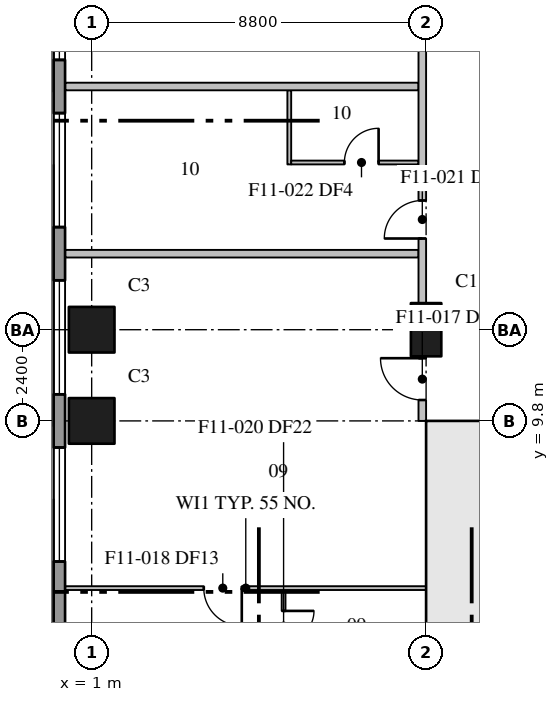
"""IFC4 building model, lengths in metres.
Left out: names, types, materials, properties, quantities, classifications, styles, units other than length and angle.
Written with IfcOpenShell. Run it as: python <this file> out.ifc"""

import sys

from ifc_helpers import new_model, si_unit, direction, frame, frame_2d, origin, origin_2d, place, context, subcontext, project, spatial, rectangle, extrude, element, fill, save


model = new_model("IFC4")
c1 = context("Model", 3, precision=1e-05, world=origin(), true_north=direction((0.0, 1.0)))
c2 = subcontext(c1, "Body", "Model", "MODEL_VIEW")
j1 = project(units=[si_unit("LENGTHUNIT", "METRE"), si_unit("PLANEANGLEUNIT", "RADIAN")], contexts=[c1])
p1 = place(None, origin())
s1 = spatial("IfcSite", under=j1, at=p1, CompositionType="ELEMENT")
p2 = place(p1, origin())
s2 = spatial("IfcBuilding", under=s1, at=p2, CompositionType="ELEMENT")
p3 = place(p2, frame((0.0, 0.0, 107.4)))
s3 = spatial("IfcBuildingStorey", under=s2, at=p3, CompositionType="ELEMENT", Elevation=107.4)
for number, where, z_axis, x_axis in (
    (1, (1.0, 9.8, 0.0), (0.0, 0.0, 1.0), (1.0, 0.0, 0.0)),
    (2, (1.0, 12.2, 0.0), (0.0, 0.0, 1.0), (1.0, 0.0, 0.0)),
):
    element("IfcColumn", number, at=place(p3, frame(where, z_axis=z_axis, x_axis=x_axis)), inside=s3, PredefinedType="COLUMN", context=c2, shape_type="SweptSolid", body=[
        extrude(rectangle(XDim=1.2, YDim=1.2, at=origin_2d()), origin(), (0.0, 0.0, 1.0), 3.7),
    ])
p4 = place(p3, frame((9.8, 12.2, 0.0), z_axis=(0.0, 0.0, 1.0), x_axis=(0.0, 1.0, 0.0)))
e3 = element("IfcColumn", 3, at=p4, inside=s3, PredefinedType="COLUMN", context=c2, shape_type="SweptSolid", body=[
    extrude(rectangle(XDim=1.4, YDim=0.8, at=origin_2d()), origin(), (0.0, 0.0, 1.0), 3.7),
])
p5 = place(p3, frame((10.6, 1.2, 0.0), z_axis=(0.0, 0.0, 1.0), x_axis=(0.0, 1.0, 0.0)))
e4 = element("IfcWall", 4, at=p5, inside=s3, PredefinedType="SHEAR", context=c2, shape_type="SweptSolid", body=[
    extrude(rectangle(XDim=8.6, YDim=0.8, at=frame_2d((4.3, 0.0))), origin(), (0.0, 0.0, 1.0), 3.7),
])
p6 = place(p3, frame((9.8, 9.6, 0.0), z_axis=(0.0, 0.0, 1.0), x_axis=(1.0, 0.0, 0.0)))
e5 = element("IfcWall", 5, at=p6, inside=s3, PredefinedType="SHEAR", context=c2, shape_type="SweptSolid", body=[
    extrude(rectangle(XDim=4.3, YDim=0.4, at=frame_2d((2.15, 0.0))), origin(), (0.0, 0.0, 1.0), 3.7),
])
p7 = place(p6, frame((2.05, 0.0, 0.0)))
e6 = element("IfcOpeningElement", 6, at=p7, cuts=e5, PredefinedType="OPENING", context=c2, shape_type="SweptSolid", body=[
    extrude(rectangle(XDim=1.2, YDim=2.1, at=frame_2d((0.6, 1.05))), frame((0.0, 0.21, 0.0), z_axis=(0.0, -1.0, 0.0), x_axis=(1.0, 0.0, 0.0)), (0.0, 0.0, 1.0), 0.42),
])
p8 = place(p3, frame((0.15, 78.7, 0.0), z_axis=(0.0, 0.0, 1.0), x_axis=(0.0, -1.0, 0.0)))
e7 = element("IfcWall", 7, at=p8, inside=s3, PredefinedType="STANDARD", context=c2, shape_type="SweptSolid", body=[
    extrude(rectangle(XDim=76.5, YDim=0.3, at=frame_2d((38.25, 0.0))), origin(), (0.0, 0.0, 1.0), 3.4),
])
p9 = place(p8, frame((3.6, 0.0, 0.75)))
e8 = element("IfcOpeningElement", 8, at=p9, cuts=e7, PredefinedType="OPENING", context=c2, shape_type="SweptSolid", body=[
    extrude(rectangle(XDim=3.0, YDim=2.3, at=frame_2d((1.5, 1.15))), frame((0.0, 0.16, 0.0), z_axis=(0.0, -1.0, 0.0), x_axis=(1.0, 0.0, 0.0)), (0.0, 0.0, 1.0), 0.32),
])
p10 = place(p8, frame((8.0, 0.0, 0.75)))
e9 = element("IfcOpeningElement", 9, at=p10, cuts=e7, PredefinedType="OPENING", context=c2, shape_type="SweptSolid", body=[
    extrude(rectangle(XDim=3.0, YDim=2.3, at=frame_2d((1.5, 1.15))), frame((0.0, 0.16, 0.0), z_axis=(0.0, -1.0, 0.0), x_axis=(1.0, 0.0, 0.0)), (0.0, 0.0, 1.0), 0.32),
])
p11 = place(p8, frame((12.4, 0.0, 0.75)))
e10 = element("IfcOpeningElement", 10, at=p11, cuts=e7, PredefinedType="OPENING", context=c2, shape_type="SweptSolid", body=[
    extrude(rectangle(XDim=3.0, YDim=2.3, at=frame_2d((1.5, 1.15))), frame((0.0, 0.16, 0.0), z_axis=(0.0, -1.0, 0.0), x_axis=(1.0, 0.0, 0.0)), (0.0, 0.0, 1.0), 0.32),
])
p12 = place(p8, frame((16.8, 0.0, 0.75)))
e11 = element("IfcOpeningElement", 11, at=p12, cuts=e7, PredefinedType="OPENING", context=c2, shape_type="SweptSolid", body=[
    extrude(rectangle(XDim=3.0, YDim=2.3, at=frame_2d((1.5, 1.15))), frame((0.0, 0.16, 0.0), z_axis=(0.0, -1.0, 0.0), x_axis=(1.0, 0.0, 0.0)), (0.0, 0.0, 1.0), 0.32),
])
p13 = place(p8, frame((21.2, 0.0, 0.75)))
e12 = element("IfcOpeningElement", 12, at=p13, cuts=e7, PredefinedType="OPENING", context=c2, shape_type="SweptSolid", body=[
    extrude(rectangle(XDim=3.0, YDim=2.3, at=frame_2d((1.5, 1.15))), frame((0.0, 0.16, 0.0), z_axis=(0.0, -1.0, 0.0), x_axis=(1.0, 0.0, 0.0)), (0.0, 0.0, 1.0), 0.32),
])
p14 = place(p8, frame((25.6, 0.0, 0.75)))
e13 = element("IfcOpeningElement", 13, at=p14, cuts=e7, PredefinedType="OPENING", context=c2, shape_type="SweptSolid", body=[
    extrude(rectangle(XDim=3.0, YDim=2.3, at=frame_2d((1.5, 1.15))), frame((0.0, 0.16, 0.0), z_axis=(0.0, -1.0, 0.0), x_axis=(1.0, 0.0, 0.0)), (0.0, 0.0, 1.0), 0.32),
])
p15 = place(p8, frame((30.0, 0.0, 0.75)))
e14 = element("IfcOpeningElement", 14, at=p15, cuts=e7, PredefinedType="OPENING", context=c2, shape_type="SweptSolid", body=[
    extrude(rectangle(XDim=3.0, YDim=2.3, at=frame_2d((1.5, 1.15))), frame((0.0, 0.16, 0.0), z_axis=(0.0, -1.0, 0.0), x_axis=(1.0, 0.0, 0.0)), (0.0, 0.0, 1.0), 0.32),
])
p16 = place(p8, frame((34.4, 0.0, 0.75)))
e15 = element("IfcOpeningElement", 15, at=p16, cuts=e7, PredefinedType="OPENING", context=c2, shape_type="SweptSolid", body=[
    extrude(rectangle(XDim=3.0, YDim=2.3, at=frame_2d((1.5, 1.15))), frame((0.0, 0.16, 0.0), z_axis=(0.0, -1.0, 0.0), x_axis=(1.0, 0.0, 0.0)), (0.0, 0.0, 1.0), 0.32),
])
p17 = place(p8, frame((38.8, 0.0, 0.75)))
e16 = element("IfcOpeningElement", 16, at=p17, cuts=e7, PredefinedType="OPENING", context=c2, shape_type="SweptSolid", body=[
    extrude(rectangle(XDim=3.0, YDim=2.3, at=frame_2d((1.5, 1.15))), frame((0.0, 0.16, 0.0), z_axis=(0.0, -1.0, 0.0), x_axis=(1.0, 0.0, 0.0)), (0.0, 0.0, 1.0), 0.32),
])
p18 = place(p8, frame((43.2, 0.0, 0.75)))
e17 = element("IfcOpeningElement", 17, at=p18, cuts=e7, PredefinedType="OPENING", context=c2, shape_type="SweptSolid", body=[
    extrude(rectangle(XDim=3.0, YDim=2.3, at=frame_2d((1.5, 1.15))), frame((0.0, 0.16, 0.0), z_axis=(0.0, -1.0, 0.0), x_axis=(1.0, 0.0, 0.0)), (0.0, 0.0, 1.0), 0.32),
])
p19 = place(p8, frame((47.6, 0.0, 0.75)))
e18 = element("IfcOpeningElement", 18, at=p19, cuts=e7, PredefinedType="OPENING", context=c2, shape_type="SweptSolid", body=[
    extrude(rectangle(XDim=3.0, YDim=2.3, at=frame_2d((1.5, 1.15))), frame((0.0, 0.16, 0.0), z_axis=(0.0, -1.0, 0.0), x_axis=(1.0, 0.0, 0.0)), (0.0, 0.0, 1.0), 0.32),
])
p20 = place(p8, frame((52.0, 0.0, 0.75)))
e19 = element("IfcOpeningElement", 19, at=p20, cuts=e7, PredefinedType="OPENING", context=c2, shape_type="SweptSolid", body=[
    extrude(rectangle(XDim=3.0, YDim=2.3, at=frame_2d((1.5, 1.15))), frame((0.0, 0.16, 0.0), z_axis=(0.0, -1.0, 0.0), x_axis=(1.0, 0.0, 0.0)), (0.0, 0.0, 1.0), 0.32),
])
p21 = place(p8, frame((56.4, 0.0, 0.75)))
e20 = element("IfcOpeningElement", 20, at=p21, cuts=e7, PredefinedType="OPENING", context=c2, shape_type="SweptSolid", body=[
    extrude(rectangle(XDim=3.0, YDim=2.3, at=frame_2d((1.5, 1.15))), frame((0.0, 0.16, 0.0), z_axis=(0.0, -1.0, 0.0), x_axis=(1.0, 0.0, 0.0)), (0.0, 0.0, 1.0), 0.32),
])
p22 = place(p8, frame((60.8, 0.0, 0.75)))
e21 = element("IfcOpeningElement", 21, at=p22, cuts=e7, PredefinedType="OPENING", context=c2, shape_type="SweptSolid", body=[
    extrude(rectangle(XDim=3.0, YDim=2.3, at=frame_2d((1.5, 1.15))), frame((0.0, 0.16, 0.0), z_axis=(0.0, -1.0, 0.0), x_axis=(1.0, 0.0, 0.0)), (0.0, 0.0, 1.0), 0.32),
])
p23 = place(p8, frame((65.2, 0.0, 0.75)))
e22 = element("IfcOpeningElement", 22, at=p23, cuts=e7, PredefinedType="OPENING", context=c2, shape_type="SweptSolid", body=[
    extrude(rectangle(XDim=3.0, YDim=2.3, at=frame_2d((1.5, 1.15))), frame((0.0, 0.16, 0.0), z_axis=(0.0, -1.0, 0.0), x_axis=(1.0, 0.0, 0.0)), (0.0, 0.0, 1.0), 0.32),
])
p24 = place(p8, frame((69.6, 0.0, 0.75)))
e23 = element("IfcOpeningElement", 23, at=p24, cuts=e7, PredefinedType="OPENING", context=c2, shape_type="SweptSolid", body=[
    extrude(rectangle(XDim=3.0, YDim=2.3, at=frame_2d((1.5, 1.15))), frame((0.0, 0.16, 0.0), z_axis=(0.0, -1.0, 0.0), x_axis=(1.0, 0.0, 0.0)), (0.0, 0.0, 1.0), 0.32),
])
p25 = place(p3, frame((9.7, 9.8, 0.0), z_axis=(0.0, 0.0, 1.0), x_axis=(0.0, 1.0, 0.0)))
e24 = element("IfcWall", 24, at=p25, inside=s3, PredefinedType="PARTITIONING", context=c2, shape_type="SweptSolid", body=[
    extrude(rectangle(XDim=1.7, YDim=0.2, at=frame_2d((0.85, 0.0))), origin(), (0.0, 0.0, 1.0), 3.4),
])
p26 = place(p25, frame((0.55, 0.0, 0.0)))
e25 = element("IfcOpeningElement", 25, at=p26, cuts=e24, PredefinedType="OPENING", context=c2, shape_type="SweptSolid", body=[
    extrude(rectangle(XDim=1.1, YDim=2.1, at=frame_2d((0.55, 1.05))), frame((0.0, 0.11, 0.0), z_axis=(0.0, -1.0, 0.0), x_axis=(1.0, 0.0, 0.0)), (0.0, 0.0, 1.0), 0.22),
])
p27 = place(p3, frame((9.7, 12.9, 0.0), z_axis=(0.0, 0.0, 1.0), x_axis=(0.0, 1.0, 0.0)))
e26 = element("IfcWall", 26, at=p27, inside=s3, PredefinedType="PARTITIONING", context=c2, shape_type="SweptSolid", body=[
    extrude(rectangle(XDim=7.5, YDim=0.2, at=frame_2d((3.75, 0.0))), origin(), (0.0, 0.0, 1.0), 3.4),
])
p28 = place(p27, frame((1.7, 0.0, 0.0)))
e27 = element("IfcOpeningElement", 27, at=p28, cuts=e26, PredefinedType="OPENING", context=c2, shape_type="SweptSolid", body=[
    extrude(rectangle(XDim=1.0, YDim=2.1, at=frame_2d((0.5, 1.05))), frame((0.0, 0.11, 0.0), z_axis=(0.0, -1.0, 0.0), x_axis=(1.0, 0.0, 0.0)), (0.0, 0.0, 1.0), 0.22),
])
for number, where, z_axis, x_axis in (
    (28, (0.31, 14.2, 0.0), (0.0, 0.0, 1.0), (1.0, 0.0, 0.0)),
    (29, (0.31, 18.6, 0.0), (0.0, 0.0, 1.0), (1.0, 0.0, 0.0)),
):
    element("IfcWall", number, at=place(p3, frame(where, z_axis=z_axis, x_axis=x_axis)), inside=s3, PredefinedType="PARTITIONING", context=c2, shape_type="SweptSolid", body=[
        extrude(rectangle(XDim=9.29, YDim=0.2, at=frame_2d((4.645, 0.0))), origin(), (0.0, 0.0, 1.0), 3.4),
    ])
p29 = place(p3, frame((6.05, 5.35, 0.0), z_axis=(0.0, 0.0, 1.0), x_axis=(0.0, -1.0, 0.0)))
e30 = element("IfcWall", 30, at=p29, inside=s3, PredefinedType="PARTITIONING", context=c2, shape_type="SweptSolid", body=[
    extrude(rectangle(XDim=4.4, YDim=0.1, at=frame_2d((2.2, 0.0))), origin(), (0.0, 0.0, 1.0), 3.4),
])
p30 = place(p29, frame((2.7, 0.0, 0.0)))
e31 = element("IfcOpeningElement", 31, at=p30, cuts=e30, PredefinedType="OPENING", context=c2, shape_type="SweptSolid", body=[
    extrude(rectangle(XDim=0.9, YDim=2.1, at=frame_2d((0.45, 1.05))), frame((0.0, 0.06, 0.0), z_axis=(0.0, -1.0, 0.0), x_axis=(1.0, 0.0, 0.0)), (0.0, 0.0, 1.0), 0.12),
])
p31 = place(p29, frame((0.55, 0.0, 0.0)))
e32 = element("IfcOpeningElement", 32, at=p31, cuts=e30, PredefinedType="OPENING", context=c2, shape_type="SweptSolid", body=[
    extrude(rectangle(XDim=0.8, YDim=2.1, at=frame_2d((0.4, 1.05))), frame((0.0, 0.06, 0.0), z_axis=(0.0, -1.0, 0.0), x_axis=(1.0, 0.0, 0.0)), (0.0, 0.0, 1.0), 0.12),
])
p32 = place(p3, frame((9.8, 5.4, 0.0), z_axis=(0.0, 0.0, 1.0), x_axis=(-1.0, 0.0, 0.0)))
e33 = element("IfcWall", 33, at=p32, inside=s3, PredefinedType="PARTITIONING", context=c2, shape_type="SweptSolid", body=[
    extrude(rectangle(XDim=9.49, YDim=0.1, at=frame_2d((4.745, 0.0))), origin(), (0.0, 0.0, 1.0), 3.4),
])
p33 = place(p32, frame((4.85, 0.0, 0.0)))
e34 = element("IfcOpeningElement", 34, at=p33, cuts=e33, PredefinedType="OPENING", context=c2, shape_type="SweptSolid", body=[
    extrude(rectangle(XDim=1.0, YDim=2.1, at=frame_2d((0.5, 1.05))), frame((0.0, 0.06, 0.0), z_axis=(0.0, -1.0, 0.0), x_axis=(1.0, 0.0, 0.0)), (0.0, 0.0, 1.0), 0.12),
])
p34 = place(p3, frame((6.2, 16.55, 0.0), z_axis=(0.0, 0.0, 1.0), x_axis=(0.0, 1.0, 0.0)))
e35 = element("IfcWall", 35, at=p34, inside=s3, PredefinedType="PARTITIONING", context=c2, shape_type="SweptSolid", body=[
    extrude(rectangle(XDim=1.95, YDim=0.1, at=frame_2d((0.975, 0.0))), origin(), (0.0, 0.0, 1.0), 3.4),
])
p35 = place(p3, frame((6.25, 16.6, 0.0), z_axis=(0.0, 0.0, 1.0), x_axis=(1.0, 0.0, 0.0)))
e36 = element("IfcWall", 36, at=p35, inside=s3, PredefinedType="PARTITIONING", context=c2, shape_type="SweptSolid", body=[
    extrude(rectangle(XDim=3.35, YDim=0.1, at=frame_2d((1.675, 0.0))), origin(), (0.0, 0.0, 1.0), 3.4),
])
p36 = place(p35, frame((1.4, 0.0, 0.0)))
e37 = element("IfcOpeningElement", 37, at=p36, cuts=e36, PredefinedType="OPENING", context=c2, shape_type="SweptSolid", body=[
    extrude(rectangle(XDim=0.9, YDim=2.1, at=frame_2d((0.45, 1.05))), frame((0.0, 0.06, 0.0), z_axis=(0.0, -1.0, 0.0), x_axis=(1.0, 0.0, 0.0)), (0.0, 0.0, 1.0), 0.12),
])
p37 = place(p21, origin())
e38 = element("IfcWindow", 38, at=p37, inside=s3, PartitioningType="SINGLE_PANEL", PredefinedType="WINDOW", context=c2, shape_type="SweptSolid", body=[
    extrude(rectangle(XDim=3.0, YDim=2.3, at=frame_2d((1.5, 1.15))), frame((0.0, 0.03, 0.0), z_axis=(0.0, -1.0, 0.0), x_axis=(1.0, 0.0, 0.0)), (0.0, 0.0, 1.0), 0.06),
])
fill(e20, e38)
p38 = place(p22, origin())
e39 = element("IfcWindow", 39, at=p38, inside=s3, PartitioningType="SINGLE_PANEL", PredefinedType="WINDOW", context=c2, shape_type="SweptSolid", body=[
    extrude(rectangle(XDim=3.0, YDim=2.3, at=frame_2d((1.5, 1.15))), frame((0.0, 0.03, 0.0), z_axis=(0.0, -1.0, 0.0), x_axis=(1.0, 0.0, 0.0)), (0.0, 0.0, 1.0), 0.06),
])
fill(e21, e39)
p39 = place(p23, origin())
e40 = element("IfcWindow", 40, at=p39, inside=s3, PartitioningType="SINGLE_PANEL", PredefinedType="WINDOW", context=c2, shape_type="SweptSolid", body=[
    extrude(rectangle(XDim=3.0, YDim=2.3, at=frame_2d((1.5, 1.15))), frame((0.0, 0.03, 0.0), z_axis=(0.0, -1.0, 0.0), x_axis=(1.0, 0.0, 0.0)), (0.0, 0.0, 1.0), 0.06),
])
fill(e22, e40)
p40 = place(p24, origin())
e41 = element("IfcWindow", 41, at=p40, inside=s3, PartitioningType="SINGLE_PANEL", PredefinedType="WINDOW", context=c2, shape_type="SweptSolid", body=[
    extrude(rectangle(XDim=3.0, YDim=2.3, at=frame_2d((1.5, 1.15))), frame((0.0, 0.03, 0.0), z_axis=(0.0, -1.0, 0.0), x_axis=(1.0, 0.0, 0.0)), (0.0, 0.0, 1.0), 0.06),
])
fill(e23, e41)
p41 = place(p26, origin())
e42 = element("IfcDoor", 42, at=p41, inside=s3, OperationType="SINGLE_SWING_RIGHT", PredefinedType="DOOR", context=c2, shape_type="SweptSolid", body=[
    extrude(rectangle(XDim=1.1, YDim=2.1, at=frame_2d((0.55, 1.05))), frame((0.0, 0.025, 0.0), z_axis=(0.0, -1.0, 0.0), x_axis=(1.0, 0.0, 0.0)), (0.0, 0.0, 1.0), 0.05),
])
fill(e25, e42)
p42 = place(p33, origin())
e43 = element("IfcDoor", 43, at=p42, inside=s3, OperationType="SINGLE_SWING_LEFT", PredefinedType="DOOR", context=c2, shape_type="SweptSolid", body=[
    extrude(rectangle(XDim=1.0, YDim=2.1, at=frame_2d((0.5, 1.05))), frame((0.0, 0.025, 0.0), z_axis=(0.0, -1.0, 0.0), x_axis=(1.0, 0.0, 0.0)), (0.0, 0.0, 1.0), 0.05),
])
fill(e34, e43)
p43 = place(p31, origin())
e44 = element("IfcDoor", 44, at=p43, inside=s3, OperationType="SINGLE_SWING_LEFT", PredefinedType="DOOR", context=c2, shape_type="SweptSolid", body=[
    extrude(rectangle(XDim=0.8, YDim=2.1, at=frame_2d((0.4, 1.05))), frame((0.0, 0.025, 0.0), z_axis=(0.0, -1.0, 0.0), x_axis=(1.0, 0.0, 0.0)), (0.0, 0.0, 1.0), 0.05),
])
fill(e32, e44)
p44 = place(p28, origin())
e45 = element("IfcDoor", 45, at=p44, inside=s3, OperationType="SINGLE_SWING_LEFT", PredefinedType="DOOR", context=c2, shape_type="SweptSolid", body=[
    extrude(rectangle(XDim=1.0, YDim=2.1, at=frame_2d((0.5, 1.05))), frame((0.0, 0.025, 0.0), z_axis=(0.0, -1.0, 0.0), x_axis=(1.0, 0.0, 0.0)), (0.0, 0.0, 1.0), 0.05),
])
fill(e27, e45)
p45 = place(p36, origin())
e46 = element("IfcDoor", 46, at=p45, inside=s3, OperationType="SINGLE_SWING_RIGHT", PredefinedType="DOOR", context=c2, shape_type="SweptSolid", body=[
    extrude(rectangle(XDim=0.9, YDim=2.1, at=frame_2d((0.45, 1.05))), frame((0.0, 0.025, 0.0), z_axis=(0.0, -1.0, 0.0), x_axis=(1.0, 0.0, 0.0)), (0.0, 0.0, 1.0), 0.05),
])
fill(e37, e46)
save(model, sys.argv[1])
